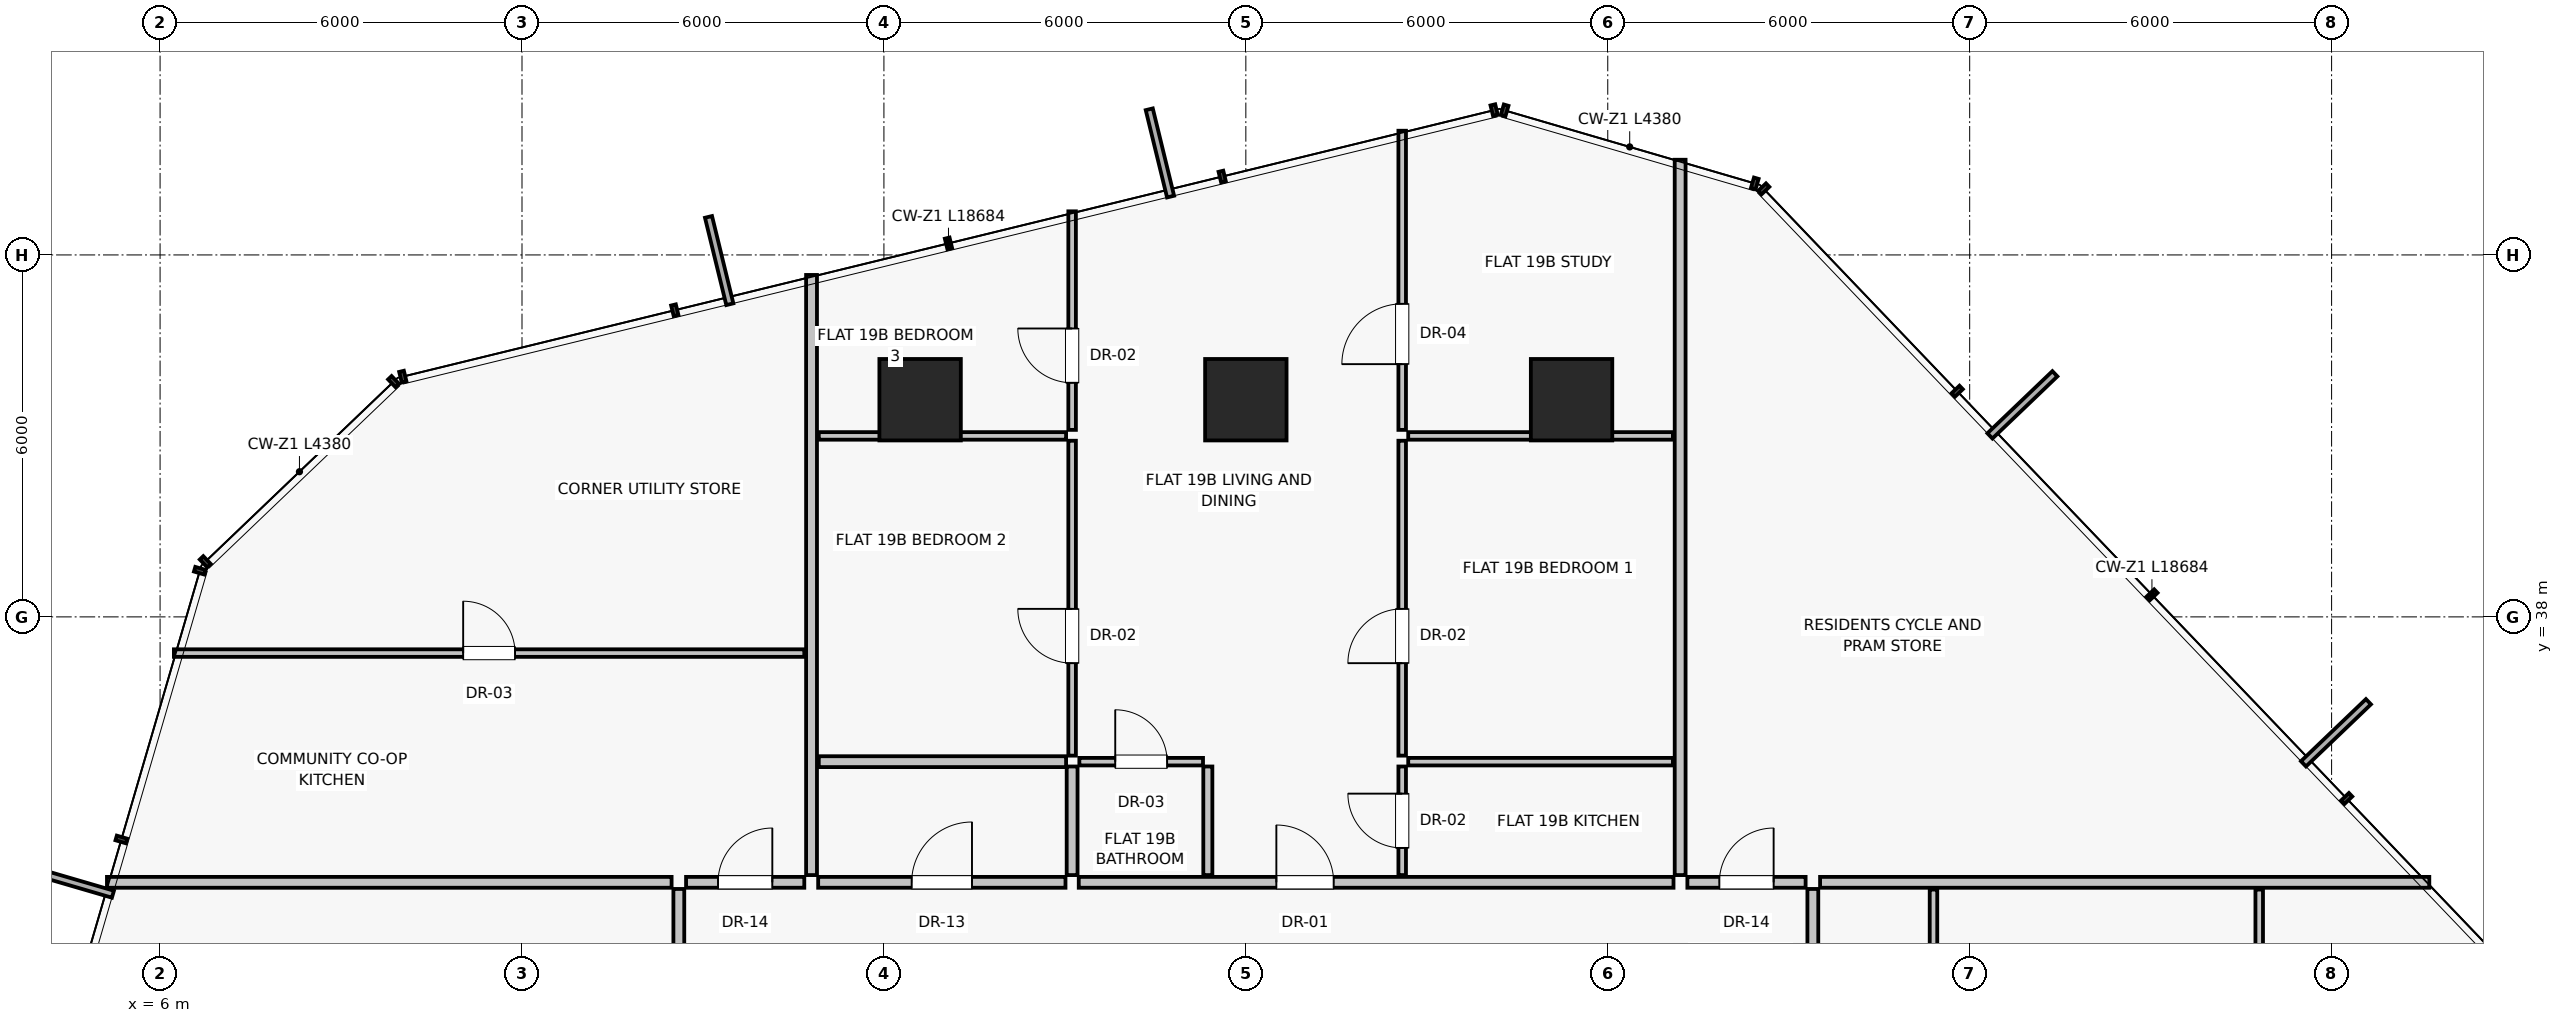
"""IFC4 building model, lengths in metres.
Left out: names, types, materials, properties, quantities, classifications, styles, units other than length and angle.
Written with IfcOpenShell. Run it as: python <this file> out.ifc"""

import sys

from ifc_helpers import new_model, si_unit, direction, frame, frame_2d, origin, origin_2d, place, context, subcontext, project, spatial, rectangle, extrude, source, transform, mapped, element, fill, save


model = new_model("IFC4")
c1 = context("Model", 3, precision=1e-05, world=origin(), true_north=direction((0.0, 1.0)))
c2 = subcontext(c1, "Body", "Model", "MODEL_VIEW")
j1 = project(units=[si_unit("LENGTHUNIT", "METRE"), si_unit("PLANEANGLEUNIT", "RADIAN")], contexts=[c1])
p1 = place(None, origin())
s1 = spatial("IfcSite", under=j1, at=p1, CompositionType="ELEMENT")
p2 = place(p1, origin())
s2 = spatial("IfcBuilding", under=s1, at=p2, CompositionType="ELEMENT")
p3 = place(p2, frame((0.0, 0.0, 70.6)))
s3 = spatial("IfcBuildingStorey", under=s2, at=p3, CompositionType="ELEMENT", Elevation=70.6)
for number, where, z_axis, x_axis in (
    (1, (29.4, 41.6, 0.0), (0.0, 0.0, 1.0), (1.0, 0.0, 0.0)),
    (2, (24.0, 41.6, 0.0), (0.0, 0.0, 1.0), (1.0, 0.0, 0.0)),
    (3, (18.6, 41.6, 0.0), (0.0, 0.0, 1.0), (1.0, 0.0, 0.0)),
):
    element("IfcColumn", number, at=place(p3, frame(where, z_axis=z_axis, x_axis=x_axis)), inside=s3, PredefinedType="COLUMN", context=c2, shape_type="SweptSolid", body=[
        extrude(rectangle(XDim=1.35, YDim=1.35, at=origin_2d()), origin(), (0.0, 0.0, 1.0), 3.25),
    ])
p4 = place(p3, frame((16.8, 33.72, 0.0), z_axis=(0.0, 0.0, 1.0), x_axis=(0.0, 1.0, 0.0)))
e4 = element("IfcWall", 4, at=p4, inside=s3, PredefinedType="PARTITIONING", context=c2, shape_type="SweptSolid", body=[
    extrude(rectangle(XDim=9.948, YDim=0.18, at=frame_2d((4.974, 0.0))), origin(), (0.0, 0.0, 1.0), 3.0),
])
p5 = place(p3, frame((31.2, 33.72, 0.0), z_axis=(0.0, 0.0, 1.0), x_axis=(0.0, 1.0, 0.0)))
e5 = element("IfcWall", 5, at=p5, inside=s3, PredefinedType="PARTITIONING", context=c2, shape_type="SweptSolid", body=[
    extrude(rectangle(XDim=11.858, YDim=0.18, at=frame_2d((5.929, 0.0))), origin(), (0.0, 0.0, 1.0), 3.0),
])
p6 = place(p3, frame((16.91, 33.6, 0.0), z_axis=(0.0, 0.0, 1.0), x_axis=(1.0, 0.0, 0.0)))
e6 = element("IfcWall", 6, at=p6, inside=s3, PredefinedType="PARTITIONING", context=c2, shape_type="SweptSolid", body=[
    extrude(rectangle(XDim=4.1, YDim=0.18, at=frame_2d((2.05, 0.0))), origin(), (0.0, 0.0, 1.0), 3.0),
])
p7 = place(p6, frame((1.55, 0.0, 0.0)))
e7 = element("IfcOpeningElement", 7, at=p7, cuts=e6, PredefinedType="OPENING", context=c2, shape_type="SweptSolid", body=[
    extrude(rectangle(XDim=1.0, YDim=2.01, at=frame_2d((0.5, 1.005))), frame((0.0, 0.1, 0.0), z_axis=(0.0, -1.0, 0.0), x_axis=(1.0, 0.0, 0.0)), (0.0, 0.0, 1.0), 0.2),
])
p8 = place(p3, frame((21.23, 33.6, 0.0), z_axis=(0.0, 0.0, 1.0), x_axis=(1.0, 0.0, 0.0)))
e8 = element("IfcWall", 8, at=p8, inside=s3, PredefinedType="PARTITIONING", context=c2, shape_type="SweptSolid", body=[
    extrude(rectangle(XDim=9.86, YDim=0.18, at=frame_2d((4.93, 0.0))), origin(), (0.0, 0.0, 1.0), 3.0),
])
p9 = place(p8, frame((3.276, 0.0, 0.0)))
e9 = element("IfcOpeningElement", 9, at=p9, cuts=e8, PredefinedType="OPENING", context=c2, shape_type="SweptSolid", body=[
    extrude(rectangle(XDim=0.95, YDim=2.02, at=frame_2d((0.475, 1.01))), frame((0.0, 0.1, 0.0), z_axis=(0.0, -1.0, 0.0), x_axis=(1.0, 0.0, 0.0)), (0.0, 0.0, 1.0), 0.2),
])
p10 = place(p3, frame((16.92, 41.0, 0.0), z_axis=(0.0, 0.0, 1.0), x_axis=(1.0, 0.0, 0.0)))
e10 = element("IfcWall", 10, at=p10, inside=s3, PredefinedType="PARTITIONING", context=c2, shape_type="SweptSolid", body=[
    extrude(rectangle(XDim=4.1, YDim=0.125, at=frame_2d((2.05, 0.0))), origin(), (0.0, 0.0, 1.0), 2.1),
])
p11 = place(p3, frame((21.12, 41.1, 0.0), z_axis=(0.0, 0.0, 1.0), x_axis=(0.0, 1.0, 0.0)))
e11 = element("IfcWall", 11, at=p11, inside=s3, PredefinedType="PARTITIONING", context=c2, shape_type="SweptSolid", body=[
    extrude(rectangle(XDim=3.623, YDim=0.125, at=frame_2d((1.812, 0.0))), origin(), (0.0, 0.0, 1.0), 3.0),
])
p12 = place(p11, frame((0.781, 0.0, 0.0)))
e12 = element("IfcOpeningElement", 12, at=p12, cuts=e11, PredefinedType="OPENING", context=c2, shape_type="SweptSolid", body=[
    extrude(rectangle(XDim=0.9, YDim=2.01, at=frame_2d((0.45, 1.005))), frame((0.0, 0.073, 0.0), z_axis=(0.0, -1.0, 0.0), x_axis=(1.0, 0.0, 0.0)), (0.0, 0.0, 1.0), 0.145),
])
p13 = place(p3, frame((26.692, 41.0, 0.0), z_axis=(0.0, 0.0, 1.0), x_axis=(1.0, 0.0, 0.0)))
e13 = element("IfcWall", 13, at=p13, inside=s3, PredefinedType="PARTITIONING", context=c2, shape_type="SweptSolid", body=[
    extrude(rectangle(XDim=4.388, YDim=0.125, at=frame_2d((2.194, 0.0))), origin(), (0.0, 0.0, 1.0), 2.1),
])
p14 = place(p3, frame((26.592, 41.1, 0.0), z_axis=(0.0, 0.0, 1.0), x_axis=(0.0, 1.0, 0.0)))
e14 = element("IfcWall", 14, at=p14, inside=s3, PredefinedType="PARTITIONING", context=c2, shape_type="SweptSolid", body=[
    extrude(rectangle(XDim=4.959, YDim=0.125, at=frame_2d((2.479, 0.0))), origin(), (0.0, 0.0, 1.0), 3.0),
])
p15 = place(p14, frame((1.09, 0.0, 0.0)))
e15 = element("IfcOpeningElement", 15, at=p15, cuts=e14, PredefinedType="OPENING", context=c2, shape_type="SweptSolid", body=[
    extrude(rectangle(XDim=1.0, YDim=2.01, at=frame_2d((0.5, 1.005))), frame((0.0, 0.073, 0.0), z_axis=(0.0, -1.0, 0.0), x_axis=(1.0, 0.0, 0.0)), (0.0, 0.0, 1.0), 0.145),
])
p16 = place(p3, frame((16.92, 35.6, 0.0), z_axis=(0.0, 0.0, 1.0), x_axis=(1.0, 0.0, 0.0)))
e16 = element("IfcWall", 16, at=p16, inside=s3, PredefinedType="PARTITIONING", context=c2, shape_type="SweptSolid", body=[
    extrude(rectangle(XDim=4.1, YDim=0.18, at=frame_2d((2.05, 0.0))), origin(), (0.0, 0.0, 1.0), 3.0),
])
p17 = place(p3, frame((21.12, 33.72, 0.0), z_axis=(0.0, 0.0, 1.0), x_axis=(0.0, 1.0, 0.0)))
e17 = element("IfcWall", 17, at=p17, inside=s3, PredefinedType="PARTITIONING", context=c2, shape_type="SweptSolid", body=[
    extrude(rectangle(XDim=1.8, YDim=0.18, at=frame_2d((0.9, 0.0))), origin(), (0.0, 0.0, 1.0), 3.0),
])
p18 = place(p3, frame((21.12, 35.7, 0.0), z_axis=(0.0, 0.0, 1.0), x_axis=(0.0, 1.0, 0.0)))
e18 = element("IfcWall", 18, at=p18, inside=s3, PredefinedType="PARTITIONING", context=c2, shape_type="SweptSolid", body=[
    extrude(rectangle(XDim=5.22, YDim=0.125, at=frame_2d((2.61, 0.0))), origin(), (0.0, 0.0, 1.0), 3.0),
])
p19 = place(p18, frame((1.533, 0.0, 0.0)))
e19 = element("IfcOpeningElement", 19, at=p19, cuts=e18, PredefinedType="OPENING", context=c2, shape_type="SweptSolid", body=[
    extrude(rectangle(XDim=0.9, YDim=2.01, at=frame_2d((0.45, 1.005))), frame((0.0, 0.073, 0.0), z_axis=(0.0, -1.0, 0.0), x_axis=(1.0, 0.0, 0.0)), (0.0, 0.0, 1.0), 0.145),
])
p20 = place(p3, frame((23.37, 33.72, 0.0), z_axis=(0.0, 0.0, 1.0), x_axis=(0.0, 1.0, 0.0)))
e20 = element("IfcWall", 20, at=p20, inside=s3, PredefinedType="PARTITIONING", context=c2, shape_type="SweptSolid", body=[
    extrude(rectangle(XDim=1.8, YDim=0.15, at=frame_2d((0.9, 0.0))), origin(), (0.0, 0.0, 1.0), 3.0),
])
p21 = place(p3, frame((21.24, 35.6, 0.0), z_axis=(0.0, 0.0, 1.0), x_axis=(1.0, 0.0, 0.0)))
e21 = element("IfcWall", 21, at=p21, inside=s3, PredefinedType="PARTITIONING", context=c2, shape_type="SweptSolid", body=[
    extrude(rectangle(XDim=2.05, YDim=0.125, at=frame_2d((1.025, 0.0))), origin(), (0.0, 0.0, 1.0), 3.0),
])
p22 = place(p21, frame((0.595, 0.0, 0.0)))
e22 = element("IfcOpeningElement", 22, at=p22, cuts=e21, PredefinedType="OPENING", context=c2, shape_type="SweptSolid", body=[
    extrude(rectangle(XDim=0.86, YDim=2.01, at=frame_2d((0.43, 1.005))), frame((0.0, 0.073, 0.0), z_axis=(0.0, -1.0, 0.0), x_axis=(1.0, 0.0, 0.0)), (0.0, 0.0, 1.0), 0.145),
])
p23 = place(p3, frame((26.592, 33.72, 0.0), z_axis=(0.0, 0.0, 1.0), x_axis=(0.0, 1.0, 0.0)))
e23 = element("IfcWall", 23, at=p23, inside=s3, PredefinedType="PARTITIONING", context=c2, shape_type="SweptSolid", body=[
    extrude(rectangle(XDim=1.8, YDim=0.125, at=frame_2d((0.9, 0.0))), origin(), (0.0, 0.0, 1.0), 3.0),
])
p24 = place(p23, frame((0.45, 0.0, 0.0)))
e24 = element("IfcOpeningElement", 24, at=p24, cuts=e23, PredefinedType="OPENING", context=c2, shape_type="SweptSolid", body=[
    extrude(rectangle(XDim=0.9, YDim=2.01, at=frame_2d((0.45, 1.005))), frame((0.0, 0.073, 0.0), z_axis=(0.0, -1.0, 0.0), x_axis=(1.0, 0.0, 0.0)), (0.0, 0.0, 1.0), 0.145),
])
p25 = place(p3, frame((26.692, 35.6, 0.0), z_axis=(0.0, 0.0, 1.0), x_axis=(1.0, 0.0, 0.0)))
e25 = element("IfcWall", 25, at=p25, inside=s3, PredefinedType="PARTITIONING", context=c2, shape_type="SweptSolid", body=[
    extrude(rectangle(XDim=4.388, YDim=0.125, at=frame_2d((2.194, 0.0))), origin(), (0.0, 0.0, 1.0), 3.0),
])
p26 = place(p3, frame((26.592, 35.7, 0.0), z_axis=(0.0, 0.0, 1.0), x_axis=(0.0, 1.0, 0.0)))
e26 = element("IfcWall", 26, at=p26, inside=s3, PredefinedType="PARTITIONING", context=c2, shape_type="SweptSolid", body=[
    extrude(rectangle(XDim=5.22, YDim=0.125, at=frame_2d((2.61, 0.0))), origin(), (0.0, 0.0, 1.0), 3.0),
])
p27 = place(p26, frame((1.533, 0.0, 0.0)))
e27 = element("IfcOpeningElement", 27, at=p27, cuts=e26, PredefinedType="OPENING", context=c2, shape_type="SweptSolid", body=[
    extrude(rectangle(XDim=0.9, YDim=2.01, at=frame_2d((0.45, 1.005))), frame((0.0, 0.073, 0.0), z_axis=(0.0, -1.0, 0.0), x_axis=(1.0, 0.0, 0.0)), (0.0, 0.0, 1.0), 0.145),
])
p28 = place(p3, frame((14.48, 33.6, 0.0), z_axis=(0.0, 0.0, 1.0), x_axis=(-1.0, 0.0, 0.0)))
e28 = element("IfcWall", 28, at=p28, inside=s3, PredefinedType="PARTITIONING", context=c2, shape_type="SweptSolid", body=[
    extrude(rectangle(XDim=9.361, YDim=0.18, at=frame_2d((4.68, 0.0))), origin(), (0.0, 0.0, 1.0), 3.0),
])
p29 = place(p3, frame((14.6, 24.11, 0.0), z_axis=(0.0, 0.0, 1.0), x_axis=(0.0, 1.0, 0.0)))
e29 = element("IfcWall", 29, at=p29, inside=s3, PredefinedType="PARTITIONING", context=c2, shape_type="SweptSolid", body=[
    extrude(rectangle(XDim=9.38, YDim=0.18, at=frame_2d((4.69, 0.0))), origin(), (0.0, 0.0, 1.0), 3.0),
])
p30 = place(p29, frame((4.19, 0.0, 0.0)))
e30 = element("IfcOpeningElement", 30, at=p30, cuts=e29, PredefinedType="OPENING", context=c2, shape_type="SweptSolid", body=[
    extrude(rectangle(XDim=1.0, YDim=2.01, at=frame_2d((0.5, 1.005))), frame((0.0, 0.1, 0.0), z_axis=(0.0, -1.0, 0.0), x_axis=(1.0, 0.0, 0.0)), (0.0, 0.0, 1.0), 0.2),
])
p31 = place(p3, frame((33.52, 33.6, 0.0), z_axis=(0.0, 0.0, 1.0), x_axis=(1.0, 0.0, 0.0)))
e31 = element("IfcWall", 31, at=p31, inside=s3, PredefinedType="PARTITIONING", context=c2, shape_type="SweptSolid", body=[
    extrude(rectangle(XDim=10.1, YDim=0.18, at=frame_2d((5.05, 0.0))), origin(), (0.0, 0.0, 1.0), 3.0),
])
p32 = place(p3, frame((33.4, 18.71, 0.0), z_axis=(0.0, 0.0, 1.0), x_axis=(0.0, 1.0, 0.0)))
e32 = element("IfcWall", 32, at=p32, inside=s3, PredefinedType="PARTITIONING", context=c2, shape_type="SweptSolid", body=[
    extrude(rectangle(XDim=14.78, YDim=0.18, at=frame_2d((7.39, 0.0))), origin(), (0.0, 0.0, 1.0), 3.0),
])
p33 = place(p32, frame((5.94, 0.0, 0.0)))
e33 = element("IfcOpeningElement", 33, at=p33, cuts=e32, PredefinedType="OPENING", context=c2, shape_type="SweptSolid", body=[
    extrude(rectangle(XDim=0.95, YDim=2.02, at=frame_2d((0.475, 1.01))), frame((0.0, 0.1, 0.0), z_axis=(0.0, -1.0, 0.0), x_axis=(1.0, 0.0, 0.0)), (0.0, 0.0, 1.0), 0.2),
])
for number, where, z_axis, x_axis in (
    (34, (40.8, 29.5, 0.0), (0.0, 0.0, 1.0), (0.0, 1.0, 0.0)),
    (35, (35.4, 29.5, 0.0), (0.0, 0.0, 1.0), (0.0, 1.0, 0.0)),
):
    element("IfcWall", number, at=place(p3, frame(where, z_axis=z_axis, x_axis=x_axis)), inside=s3, PredefinedType="PARTITIONING", context=c2, shape_type="SweptSolid", body=[
        extrude(rectangle(XDim=3.98, YDim=0.125, at=frame_2d((1.99, 0.0))), origin(), (0.0, 0.0, 1.0), 3.0),
    ])
p34 = place(p3, frame((14.72, 33.6, 0.0), z_axis=(0.0, 0.0, 1.0), x_axis=(1.0, 0.0, 0.0)))
e36 = element("IfcWall", 36, at=p34, inside=s3, PredefinedType="PARTITIONING", context=c2, shape_type="SweptSolid", body=[
    extrude(rectangle(XDim=1.96, YDim=0.18, at=frame_2d((0.98, 0.0))), origin(), (0.0, 0.0, 1.0), 3.0),
])
p35 = place(p34, frame((0.53, 0.0, 0.0)))
e37 = element("IfcOpeningElement", 37, at=p35, cuts=e36, PredefinedType="OPENING", context=c2, shape_type="SweptSolid", body=[
    extrude(rectangle(XDim=0.9, YDim=2.01, at=frame_2d((0.45, 1.005))), frame((0.0, 0.1, 0.0), z_axis=(0.0, -1.0, 0.0), x_axis=(1.0, 0.0, 0.0)), (0.0, 0.0, 1.0), 0.2),
])
p36 = place(p3, frame((6.229, 37.4, 0.0), z_axis=(0.0, 0.0, 1.0), x_axis=(1.0, 0.0, 0.0)))
e38 = element("IfcWall", 38, at=p36, inside=s3, PredefinedType="PARTITIONING", context=c2, shape_type="SweptSolid", body=[
    extrude(rectangle(XDim=10.451, YDim=0.125, at=frame_2d((5.225, 0.0))), origin(), (0.0, 0.0, 1.0), 3.0),
])
p37 = place(p36, frame((4.795, 0.0, 0.0)))
e39 = element("IfcOpeningElement", 39, at=p37, cuts=e38, PredefinedType="OPENING", context=c2, shape_type="SweptSolid", body=[
    extrude(rectangle(XDim=0.86, YDim=2.01, at=frame_2d((0.43, 1.005))), frame((0.0, 0.073, 0.0), z_axis=(0.0, -1.0, 0.0), x_axis=(1.0, 0.0, 0.0)), (0.0, 0.0, 1.0), 0.145),
])
p38 = place(p3, frame((31.32, 33.6, 0.0), z_axis=(0.0, 0.0, 1.0), x_axis=(1.0, 0.0, 0.0)))
e40 = element("IfcWall", 40, at=p38, inside=s3, PredefinedType="PARTITIONING", context=c2, shape_type="SweptSolid", body=[
    extrude(rectangle(XDim=1.96, YDim=0.18, at=frame_2d((0.98, 0.0))), origin(), (0.0, 0.0, 1.0), 3.0),
])
p39 = place(p38, frame((0.53, 0.0, 0.0)))
e41 = element("IfcOpeningElement", 41, at=p39, cuts=e40, PredefinedType="OPENING", context=c2, shape_type="SweptSolid", body=[
    extrude(rectangle(XDim=0.9, YDim=2.01, at=frame_2d((0.45, 1.005))), frame((0.0, 0.1, 0.0), z_axis=(0.0, -1.0, 0.0), x_axis=(1.0, 0.0, 0.0)), (0.0, 0.0, 1.0), 0.2),
])
m1 = source(origin(), c2, "Body", "SweptSolid", [
    extrude(rectangle(XDim=1.0, YDim=2.01, at=frame_2d((0.5, 1.005))), frame((0.0, 0.025, 0.0), z_axis=(0.0, -1.0, 0.0), x_axis=(1.0, 0.0, 0.0)), (0.0, 0.0, 1.0), 0.05),
])
p40 = place(p7, origin())
e42 = element("IfcDoor", 42, at=p40, inside=s3, OperationType="SINGLE_SWING_RIGHT", PredefinedType="DOOR", context=c2, shape_type="MappedRepresentation", body=[
    mapped(m1, transform((0.0, 0.0, 0.0), scale=1.0)),
])
fill(e7, e42)
m2 = source(origin(), c2, "Body", "SweptSolid", [
    extrude(rectangle(XDim=0.95, YDim=2.02, at=frame_2d((0.475, 1.01))), frame((0.0, 0.025, 0.0), z_axis=(0.0, -1.0, 0.0), x_axis=(1.0, 0.0, 0.0)), (0.0, 0.0, 1.0), 0.05),
])
p41 = place(p9, origin())
e43 = element("IfcDoor", 43, at=p41, inside=s3, OperationType="SINGLE_SWING_LEFT", PredefinedType="DOOR", context=c2, shape_type="MappedRepresentation", body=[
    mapped(m2, transform((0.0, 0.0, 0.0), scale=1.0)),
])
fill(e9, e43)
m3 = source(origin(), c2, "Body", "SweptSolid", [
    extrude(rectangle(XDim=0.9, YDim=2.01, at=frame_2d((0.45, 1.005))), frame((0.0, 0.025, 0.0), z_axis=(0.0, -1.0, 0.0), x_axis=(1.0, 0.0, 0.0)), (0.0, 0.0, 1.0), 0.05),
])
p42 = place(p12, origin())
e44 = element("IfcDoor", 44, at=p42, inside=s3, OperationType="SINGLE_SWING_RIGHT", PredefinedType="DOOR", context=c2, shape_type="MappedRepresentation", body=[
    mapped(m3, transform((0.0, 0.0, 0.0), scale=1.0)),
])
fill(e12, e44)
p43 = place(p15, origin())
e45 = element("IfcDoor", 45, at=p43, inside=s3, OperationType="SINGLE_SWING_LEFT", PredefinedType="DOOR", context=c2, shape_type="MappedRepresentation", body=[
    mapped(m1, transform((0.0, 0.0, 0.0), scale=1.0)),
])
fill(e15, e45)
p44 = place(p19, origin())
e46 = element("IfcDoor", 46, at=p44, inside=s3, OperationType="SINGLE_SWING_RIGHT", PredefinedType="DOOR", context=c2, shape_type="MappedRepresentation", body=[
    mapped(m3, transform((0.0, 0.0, 0.0), scale=1.0)),
])
fill(e19, e46)
m4 = source(origin(), c2, "Body", "SweptSolid", [
    extrude(rectangle(XDim=0.86, YDim=2.01, at=frame_2d((0.43, 1.005))), frame((0.0, 0.025, 0.0), z_axis=(0.0, -1.0, 0.0), x_axis=(1.0, 0.0, 0.0)), (0.0, 0.0, 1.0), 0.05),
])
p45 = place(p22, origin())
e47 = element("IfcDoor", 47, at=p45, inside=s3, OperationType="SINGLE_SWING_LEFT", PredefinedType="DOOR", context=c2, shape_type="MappedRepresentation", body=[
    mapped(m4, transform((0.0, 0.0, 0.0), scale=1.0)),
])
fill(e22, e47)
p46 = place(p24, origin())
e48 = element("IfcDoor", 48, at=p46, inside=s3, OperationType="SINGLE_SWING_RIGHT", PredefinedType="DOOR", context=c2, shape_type="MappedRepresentation", body=[
    mapped(m3, transform((0.0, 0.0, 0.0), scale=1.0)),
])
fill(e24, e48)
p47 = place(p27, origin())
e49 = element("IfcDoor", 49, at=p47, inside=s3, OperationType="SINGLE_SWING_LEFT", PredefinedType="DOOR", context=c2, shape_type="MappedRepresentation", body=[
    mapped(m3, transform((0.0, 0.0, 0.0), scale=1.0)),
])
fill(e27, e49)
p48 = place(p35, origin())
e50 = element("IfcDoor", 50, at=p48, inside=s3, OperationType="SINGLE_SWING_RIGHT", PredefinedType="DOOR", context=c2, shape_type="MappedRepresentation", body=[
    mapped(m3, transform((0.0, 0.0, 0.0), scale=1.0)),
])
fill(e37, e50)
p49 = place(p37, origin())
e51 = element("IfcDoor", 51, at=p49, inside=s3, OperationType="SINGLE_SWING_LEFT", PredefinedType="DOOR", context=c2, shape_type="MappedRepresentation", body=[
    mapped(m4, transform((0.0, 0.0, 0.0), scale=1.0)),
])
fill(e39, e51)
p50 = place(p39, origin())
e52 = element("IfcDoor", 52, at=p50, inside=s3, OperationType="SINGLE_SWING_RIGHT", PredefinedType="DOOR", context=c2, shape_type="MappedRepresentation", body=[
    mapped(m3, transform((0.0, 0.0, 0.0), scale=1.0)),
])
fill(e41, e52)
save(model, sys.argv[1])
